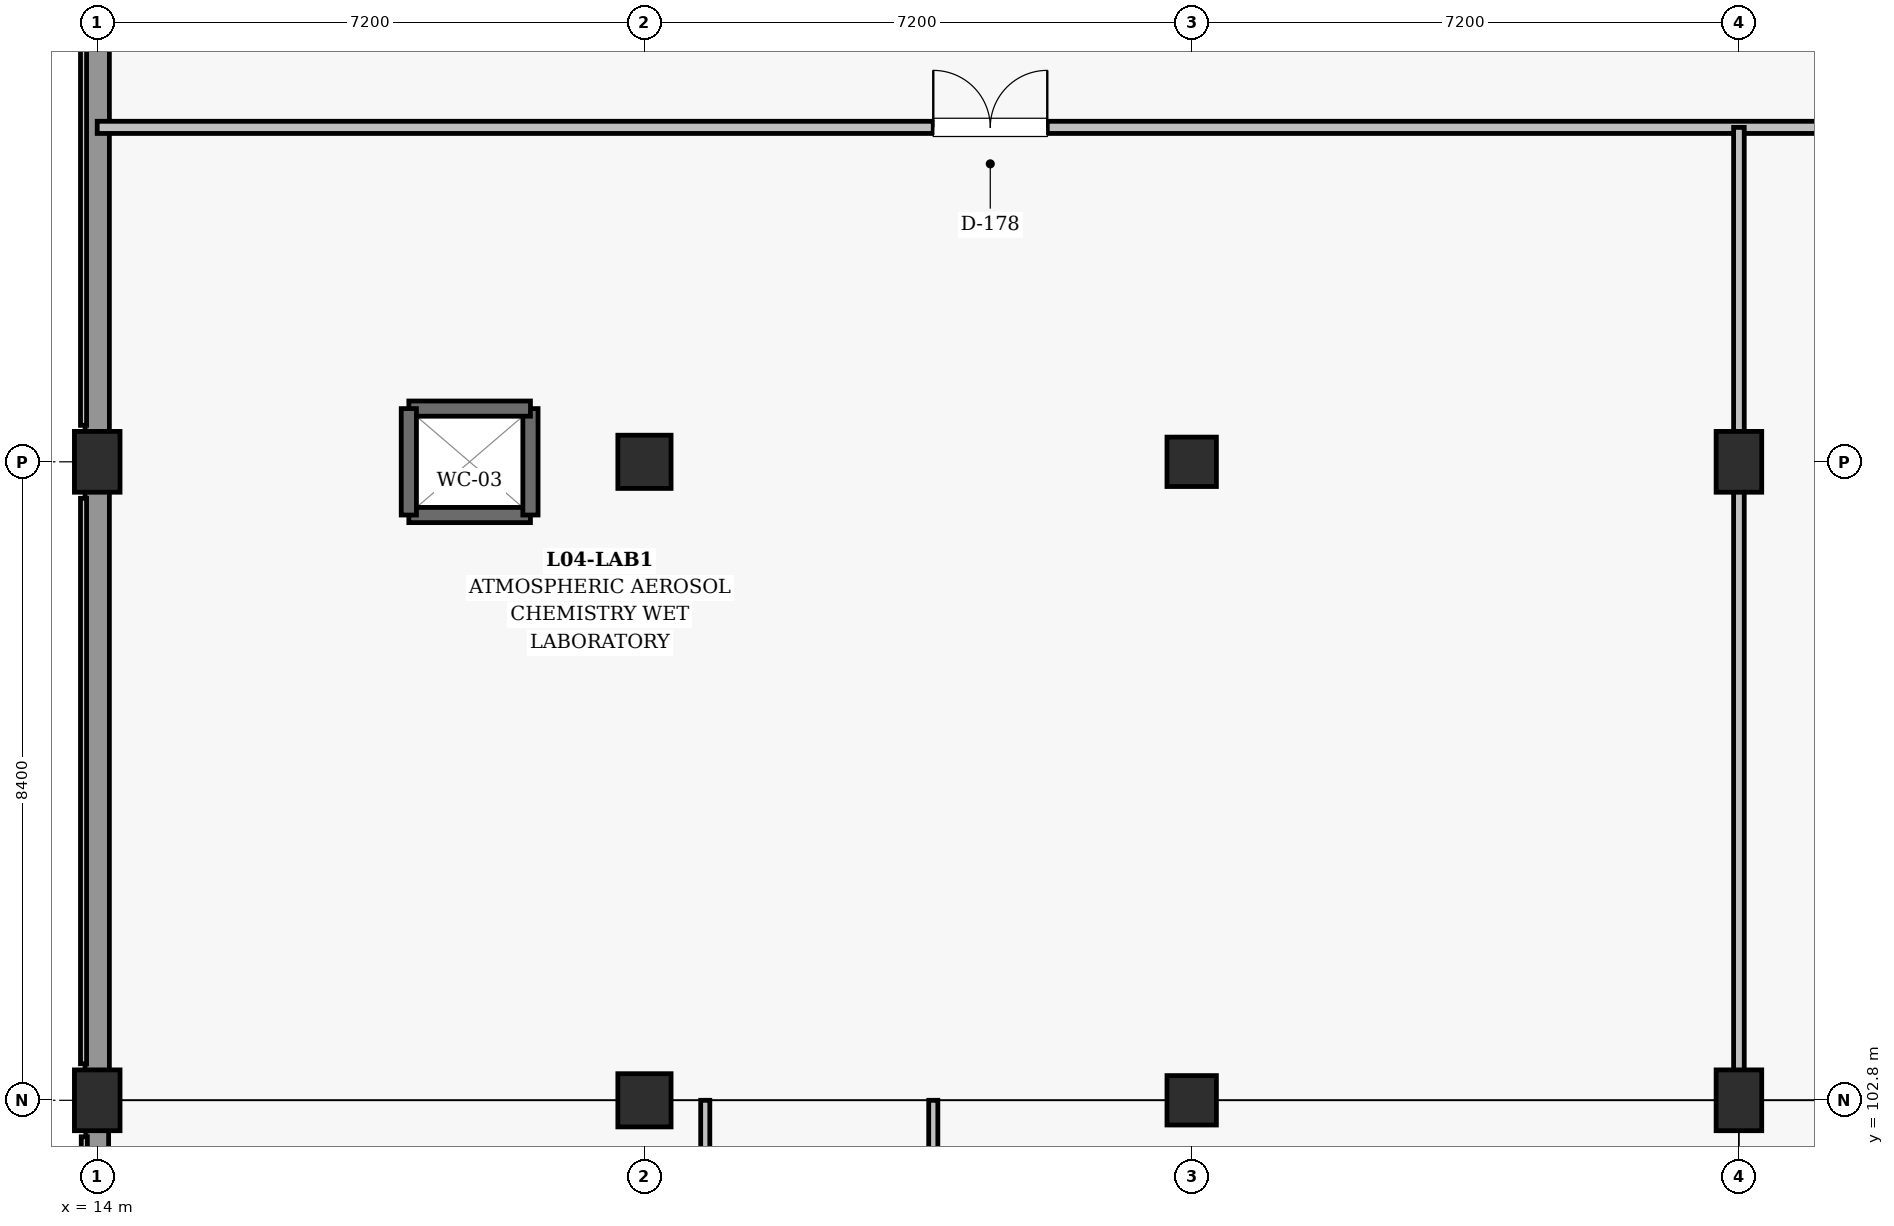
"""IFC4 building model, lengths in metres.
Left out: names, types, materials, properties, quantities, classifications, styles, units other than length and angle.
Written with IfcOpenShell. Run it as: python <this file> out.ifc"""

import sys

from ifc_helpers import new_model, si_unit, direction, frame, frame_2d, origin, origin_2d, place, context, subcontext, project, spatial, rectangle, extrude, element, fill, save


model = new_model("IFC4")
c1 = context("Model", 3, precision=1e-05, world=origin(), true_north=direction((0.0, 1.0)))
c2 = subcontext(c1, "Body", "Model", "MODEL_VIEW")
j1 = project(units=[si_unit("LENGTHUNIT", "METRE"), si_unit("PLANEANGLEUNIT", "RADIAN")], contexts=[c1])
p1 = place(None, origin())
s1 = spatial("IfcSite", under=j1, at=p1, CompositionType="ELEMENT")
p2 = place(p1, origin())
s2 = spatial("IfcBuilding", under=s1, at=p2, CompositionType="ELEMENT")
p3 = place(p2, frame((0.0, 0.0, 18.9)))
s3 = spatial("IfcBuildingStorey", under=s2, at=p3, CompositionType="ELEMENT", Elevation=18.9)
for number, where, z_axis, x_axis in (
    (1, (14.0, 102.8, 0.0), (0.0, 0.0, 1.0), (1.0, 0.0, 0.0)),
    (2, (14.0, 111.2, 0.0), (0.0, 0.0, 1.0), (1.0, 0.0, 0.0)),
):
    element("IfcColumn", number, at=place(p3, frame(where, z_axis=z_axis, x_axis=x_axis)), inside=s3, PredefinedType="COLUMN", context=c2, shape_type="SweptSolid", body=[
        extrude(rectangle(XDim=0.6, YDim=0.8, at=origin_2d()), origin(), (0.0, 0.0, 1.0), 4.5),
    ])
for number, where, z_axis, x_axis in (
    (3, (21.2, 102.8, 0.0), (0.0, 0.0, 1.0), (1.0, 0.0, 0.0)),
    (4, (21.2, 111.2, 0.0), (0.0, 0.0, 1.0), (1.0, 0.0, 0.0)),
):
    element("IfcColumn", number, at=place(p3, frame(where, z_axis=z_axis, x_axis=x_axis)), inside=s3, PredefinedType="COLUMN", context=c2, shape_type="SweptSolid", body=[
        extrude(rectangle(XDim=0.7, YDim=0.7, at=origin_2d()), origin(), (0.0, 0.0, 1.0), 4.5),
    ])
for number, where, z_axis, x_axis in (
    (5, (28.4, 102.8, 0.0), (0.0, 0.0, 1.0), (1.0, 0.0, 0.0)),
    (6, (28.4, 111.2, 0.0), (0.0, 0.0, 1.0), (1.0, 0.0, 0.0)),
):
    element("IfcColumn", number, at=place(p3, frame(where, z_axis=z_axis, x_axis=x_axis)), inside=s3, PredefinedType="COLUMN", context=c2, shape_type="SweptSolid", body=[
        extrude(rectangle(XDim=0.65, YDim=0.65, at=origin_2d()), origin(), (0.0, 0.0, 1.0), 4.5),
    ])
for number, where, z_axis, x_axis in (
    (7, (35.6, 102.8, 0.0), (0.0, 0.0, 1.0), (1.0, 0.0, 0.0)),
    (8, (35.6, 111.2, 0.0), (0.0, 0.0, 1.0), (1.0, 0.0, 0.0)),
):
    element("IfcColumn", number, at=place(p3, frame(where, z_axis=z_axis, x_axis=x_axis)), inside=s3, PredefinedType="COLUMN", context=c2, shape_type="SweptSolid", body=[
        extrude(rectangle(XDim=0.6, YDim=0.8, at=origin_2d()), origin(), (0.0, 0.0, 1.0), 4.5),
    ])
p4 = place(p3, frame((14.0, 103.18, 0.0), z_axis=(0.0, 0.0, 1.0), x_axis=(0.0, 1.0, 0.0)))
e9 = element("IfcWall", 9, at=p4, inside=s3, PredefinedType="SOLIDWALL", context=c2, shape_type="SweptSolid", body=[
    extrude(rectangle(XDim=7.64, YDim=0.32, at=frame_2d((3.82, 0.0))), origin(), (0.0, 0.0, 1.0), 3.355),
])
p5 = place(p3, frame((14.0, 111.58, 0.0), z_axis=(0.0, 0.0, 1.0), x_axis=(0.0, 1.0, 0.0)))
e10 = element("IfcWall", 10, at=p5, inside=s3, PredefinedType="SOLIDWALL", context=c2, shape_type="SweptSolid", body=[
    extrude(rectangle(XDim=7.715, YDim=0.32, at=frame_2d((3.857, 0.0))), origin(), (0.0, 0.0, 1.0), 3.405),
])
p6 = place(p3, frame((14.0, 94.755, 0.0), z_axis=(0.0, 0.0, 1.0), x_axis=(0.0, 1.0, 0.0)))
e11 = element("IfcWall", 11, at=p6, inside=s3, PredefinedType="SOLIDWALL", context=c2, shape_type="SweptSolid", body=[
    extrude(rectangle(XDim=7.665, YDim=0.3, at=frame_2d((3.833, 0.0))), origin(), (0.0, 0.0, 1.0), 3.355),
])
p7 = place(p3, frame((18.1, 110.5, 0.0), z_axis=(0.0, 0.0, 1.0), x_axis=(1.0, 0.0, 0.0)))
e12 = element("IfcWall", 12, at=p7, inside=s3, PredefinedType="SHEAR", context=c2, shape_type="SweptSolid", body=[
    extrude(rectangle(XDim=1.6, YDim=0.2, at=frame_2d((0.8, 0.0))), origin(), (0.0, 0.0, 1.0), 4.14),
])
p8 = place(p3, frame((19.7, 110.5, 0.0), z_axis=(0.0, 0.0, 1.0), x_axis=(0.0, 1.0, 0.0)))
e13 = element("IfcWall", 13, at=p8, inside=s3, PredefinedType="SHEAR", context=c2, shape_type="SweptSolid", body=[
    extrude(rectangle(XDim=1.4, YDim=0.2, at=frame_2d((0.7, 0.0))), origin(), (0.0, 0.0, 1.0), 4.14),
])
p9 = place(p3, frame((19.7, 111.9, 0.0), z_axis=(0.0, 0.0, 1.0), x_axis=(-1.0, 0.0, 0.0)))
e14 = element("IfcWall", 14, at=p9, inside=s3, PredefinedType="SHEAR", context=c2, shape_type="SweptSolid", body=[
    extrude(rectangle(XDim=1.6, YDim=0.2, at=frame_2d((0.8, 0.0))), origin(), (0.0, 0.0, 1.0), 4.14),
])
p10 = place(p3, frame((18.1, 111.9, 0.0), z_axis=(0.0, 0.0, 1.0), x_axis=(0.0, -1.0, 0.0)))
e15 = element("IfcWall", 15, at=p10, inside=s3, PredefinedType="SHEAR", context=c2, shape_type="SweptSolid", body=[
    extrude(rectangle(XDim=1.4, YDim=0.2, at=frame_2d((0.7, 0.0))), origin(), (0.0, 0.0, 1.0), 4.14),
])
p11 = place(p3, frame((14.0, 115.6, 0.0), z_axis=(0.0, 0.0, 1.0), x_axis=(1.0, 0.0, 0.0)))
e16 = element("IfcWall", 16, at=p11, inside=s3, PredefinedType="PARTITIONING", context=c2, shape_type="SweptSolid", body=[
    extrude(rectangle(XDim=100.8, YDim=0.16, at=frame_2d((50.4, 0.0))), origin(), (0.0, 0.0, 1.0), 2.96),
])
p12 = place(p11, frame((29.9, 0.0, 0.0)))
e17 = element("IfcOpeningElement", 17, at=p12, cuts=e16, PredefinedType="OPENING", context=c2, shape_type="SweptSolid", body=[
    extrude(rectangle(XDim=1.0, YDim=2.15, at=frame_2d((0.5, 1.075))), frame((0.0, 0.09, 0.0), z_axis=(0.0, -1.0, 0.0), x_axis=(1.0, 0.0, 0.0)), (0.0, 0.0, 1.0), 0.18),
])
p13 = place(p11, frame((11.0, 0.0, 0.0)))
e18 = element("IfcOpeningElement", 18, at=p13, cuts=e16, PredefinedType="OPENING", context=c2, shape_type="SweptSolid", body=[
    extrude(rectangle(XDim=1.5, YDim=2.25, at=frame_2d((0.75, 1.125))), frame((0.0, 0.09, 0.0), z_axis=(0.0, -1.0, 0.0), x_axis=(1.0, 0.0, 0.0)), (0.0, 0.0, 1.0), 0.18),
])
p14 = place(p11, frame((25.4, 0.0, 0.0)))
e19 = element("IfcOpeningElement", 19, at=p14, cuts=e16, PredefinedType="OPENING", context=c2, shape_type="SweptSolid", body=[
    extrude(rectangle(XDim=1.18, YDim=2.2, at=frame_2d((0.59, 1.1))), frame((0.0, 0.09, 0.0), z_axis=(0.0, -1.0, 0.0), x_axis=(1.0, 0.0, 0.0)), (0.0, 0.0, 1.0), 0.18),
])
p15 = place(p11, frame((34.4, 0.0, 0.0)))
e20 = element("IfcOpeningElement", 20, at=p15, cuts=e16, PredefinedType="OPENING", context=c2, shape_type="SweptSolid", body=[
    extrude(rectangle(XDim=1.25, YDim=2.2, at=frame_2d((0.625, 1.1))), frame((0.0, 0.09, 0.0), z_axis=(0.0, -1.0, 0.0), x_axis=(1.0, 0.0, 0.0)), (0.0, 0.0, 1.0), 0.18),
])
p16 = place(p11, frame((47.7, 0.0, 0.0)))
e21 = element("IfcOpeningElement", 21, at=p16, cuts=e16, PredefinedType="OPENING", context=c2, shape_type="SweptSolid", body=[
    extrude(rectangle(XDim=2.05, YDim=2.3, at=frame_2d((1.025, 1.15))), frame((0.0, 0.09, 0.0), z_axis=(0.0, -1.0, 0.0), x_axis=(1.0, 0.0, 0.0)), (0.0, 0.0, 1.0), 0.18),
])
p17 = place(p11, frame((68.4, 0.0, 0.0)))
e22 = element("IfcOpeningElement", 22, at=p17, cuts=e16, PredefinedType="OPENING", context=c2, shape_type="SweptSolid", body=[
    extrude(rectangle(XDim=1.5, YDim=2.25, at=frame_2d((0.75, 1.125))), frame((0.0, 0.09, 0.0), z_axis=(0.0, -1.0, 0.0), x_axis=(1.0, 0.0, 0.0)), (0.0, 0.0, 1.0), 0.18),
])
p18 = place(p11, frame((89.8, 0.0, 0.0)))
e23 = element("IfcOpeningElement", 23, at=p18, cuts=e16, PredefinedType="OPENING", context=c2, shape_type="SweptSolid", body=[
    extrude(rectangle(XDim=1.5, YDim=2.25, at=frame_2d((0.75, 1.125))), frame((0.0, 0.09, 0.0), z_axis=(0.0, -1.0, 0.0), x_axis=(1.0, 0.0, 0.0)), (0.0, 0.0, 1.0), 0.18),
])
p19 = place(p3, frame((35.6, 102.8, 0.0), z_axis=(0.0, 0.0, 1.0), x_axis=(0.0, 1.0, 0.0)))
e24 = element("IfcWall", 24, at=p19, inside=s3, PredefinedType="PARTITIONING", context=c2, shape_type="SweptSolid", body=[
    extrude(rectangle(XDim=12.8, YDim=0.14, at=frame_2d((6.4, 0.0))), origin(), (0.0, 0.0, 1.0), 2.96),
])
p20 = place(p3, frame((25.0, 14.0, 0.0), z_axis=(0.0, 0.0, 1.0), x_axis=(0.0, 1.0, 0.0)))
e25 = element("IfcWall", 25, at=p20, inside=s3, PredefinedType="PARTITIONING", context=c2, shape_type="SweptSolid", body=[
    extrude(rectangle(XDim=88.8, YDim=0.12, at=frame_2d((44.4, 0.0))), origin(), (0.0, 0.0, 1.0), 3.38),
])
p21 = place(p20, frame((11.0, 0.0, 0.0)))
e26 = element("IfcOpeningElement", 26, at=p21, cuts=e25, PredefinedType="OPENING", context=c2, shape_type="SweptSolid", body=[
    extrude(rectangle(XDim=1.0, YDim=2.15, at=frame_2d((0.5, 1.075))), frame((0.0, 0.07, 0.0), z_axis=(0.0, -1.0, 0.0), x_axis=(1.0, 0.0, 0.0)), (0.0, 0.0, 1.0), 0.14),
])
p22 = place(p20, frame((31.5, 0.0, 0.0)))
e27 = element("IfcOpeningElement", 27, at=p22, cuts=e25, PredefinedType="OPENING", context=c2, shape_type="SweptSolid", body=[
    extrude(rectangle(XDim=1.1, YDim=2.15, at=frame_2d((0.55, 1.075))), frame((0.0, 0.07, 0.0), z_axis=(0.0, -1.0, 0.0), x_axis=(1.0, 0.0, 0.0)), (0.0, 0.0, 1.0), 0.14),
])
p23 = place(p20, frame((53.3, 0.0, 0.0)))
e28 = element("IfcOpeningElement", 28, at=p23, cuts=e25, PredefinedType="OPENING", context=c2, shape_type="SweptSolid", body=[
    extrude(rectangle(XDim=1.18, YDim=2.2, at=frame_2d((0.59, 1.1))), frame((0.0, 0.07, 0.0), z_axis=(0.0, -1.0, 0.0), x_axis=(1.0, 0.0, 0.0)), (0.0, 0.0, 1.0), 0.14),
])
p24 = place(p20, frame((69.3, 0.0, 0.0)))
e29 = element("IfcOpeningElement", 29, at=p24, cuts=e25, PredefinedType="OPENING", context=c2, shape_type="SweptSolid", body=[
    extrude(rectangle(XDim=1.25, YDim=2.2, at=frame_2d((0.625, 1.1))), frame((0.0, 0.07, 0.0), z_axis=(0.0, -1.0, 0.0), x_axis=(1.0, 0.0, 0.0)), (0.0, 0.0, 1.0), 0.14),
])
p25 = place(p20, frame((82.9, 0.0, 0.0)))
e30 = element("IfcOpeningElement", 30, at=p25, cuts=e25, PredefinedType="OPENING", context=c2, shape_type="SweptSolid", body=[
    extrude(rectangle(XDim=1.35, YDim=2.2, at=frame_2d((0.675, 1.1))), frame((0.0, 0.07, 0.0), z_axis=(0.0, -1.0, 0.0), x_axis=(1.0, 0.0, 0.0)), (0.0, 0.0, 1.0), 0.14),
])
p26 = place(p3, frame((22.0, 63.2, 0.0), z_axis=(0.0, 0.0, 1.0), x_axis=(0.0, 1.0, 0.0)))
e31 = element("IfcWall", 31, at=p26, inside=s3, PredefinedType="PARTITIONING", context=c2, shape_type="SweptSolid", body=[
    extrude(rectangle(XDim=39.6, YDim=0.12, at=frame_2d((19.8, 0.0))), origin(), (0.0, 0.0, 1.0), 3.38),
])
p27 = place(p26, frame((11.3, 0.0, 0.0)))
e32 = element("IfcOpeningElement", 32, at=p27, cuts=e31, PredefinedType="OPENING", context=c2, shape_type="SweptSolid", body=[
    extrude(rectangle(XDim=1.1, YDim=2.15, at=frame_2d((0.55, 1.075))), frame((0.0, 0.07, 0.0), z_axis=(0.0, -1.0, 0.0), x_axis=(1.0, 0.0, 0.0)), (0.0, 0.0, 1.0), 0.14),
])
p28 = place(p26, frame((26.3, 0.0, 0.0)))
e33 = element("IfcOpeningElement", 33, at=p28, cuts=e31, PredefinedType="OPENING", context=c2, shape_type="SweptSolid", body=[
    extrude(rectangle(XDim=1.18, YDim=2.2, at=frame_2d((0.59, 1.1))), frame((0.0, 0.07, 0.0), z_axis=(0.0, -1.0, 0.0), x_axis=(1.0, 0.0, 0.0)), (0.0, 0.0, 1.0), 0.14),
])
p29 = place(p13, origin())
e34 = element("IfcDoor", 34, at=p29, inside=s3, OperationType="DOUBLE_DOOR_SINGLE_SWING", PredefinedType="DOOR", context=c2, shape_type="SweptSolid", body=[
    extrude(rectangle(XDim=1.5, YDim=2.25, at=frame_2d((0.75, 1.125))), frame((0.0, 0.025, 0.0), z_axis=(0.0, -1.0, 0.0), x_axis=(1.0, 0.0, 0.0)), (0.0, 0.0, 1.0), 0.05),
])
fill(e18, e34)
save(model, sys.argv[1])
